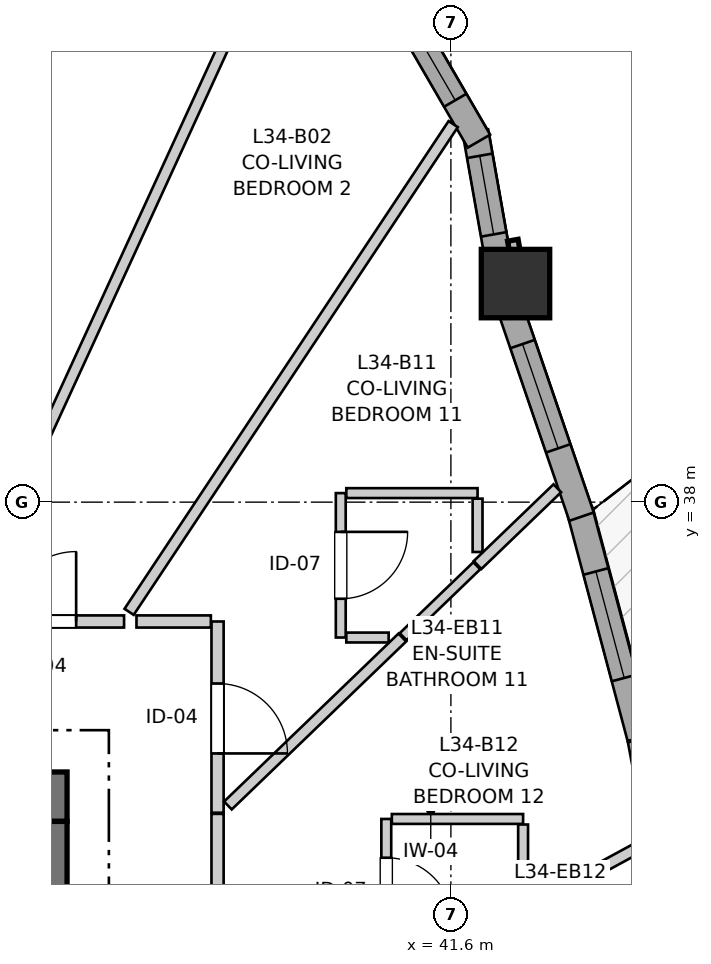
"""IFC4 building model, lengths in metres.
Left out: names, types, materials, properties, quantities, classifications, styles, units other than length and angle.
Written with IfcOpenShell. Run it as: python <this file> out.ifc"""

import sys

from ifc_helpers import new_model, si_unit, direction, frame, frame_2d, origin, origin_2d, place, context, subcontext, project, spatial, rectangle, extrude, source, transform, mapped, element, fill, save


model = new_model("IFC4")
c1 = context("Model", 3, precision=1e-05, world=origin(), true_north=direction((0.0, 1.0)))
c2 = subcontext(c1, "Body", "Model", "MODEL_VIEW")
j1 = project(units=[si_unit("LENGTHUNIT", "METRE"), si_unit("PLANEANGLEUNIT", "RADIAN")], contexts=[c1])
p1 = place(None, origin())
s1 = spatial("IfcSite", under=j1, at=p1, CompositionType="ELEMENT")
p2 = place(p1, origin())
s2 = spatial("IfcBuilding", under=s1, at=p2, CompositionType="ELEMENT")
p3 = place(p2, frame((0.0, 0.0, 115.2)))
s3 = spatial("IfcBuildingStorey", under=s2, at=p3, CompositionType="ELEMENT", Elevation=115.2)
p4 = place(p3, frame((36.55, 34.125, 0.0), z_axis=(0.0, 0.0, 1.0), x_axis=(-1.0, 0.0, 0.0)))
e1 = element("IfcWall", 1, at=p4, inside=s3, PredefinedType="SHEAR", context=c2, shape_type="SweptSolid", body=[
    extrude(rectangle(XDim=12.4, YDim=0.65, at=frame_2d((6.2, 0.0))), origin(), (0.0, 0.0, 1.0), 2.95),
])
p5 = place(p3, frame((36.225, 18.2, 0.0), z_axis=(0.0, 0.0, 1.0), x_axis=(0.0, 1.0, 0.0)))
e2 = element("IfcWall", 2, at=p5, inside=s3, PredefinedType="SHEAR", context=c2, shape_type="SweptSolid", body=[
    extrude(rectangle(XDim=15.6, YDim=0.65, at=frame_2d((7.8, 0.0))), origin(), (0.0, 0.0, 1.0), 2.95),
])
p6 = place(p5, frame((4.25, 0.0, 0.0)))
e3 = element("IfcOpeningElement", 3, at=p6, cuts=e2, PredefinedType="OPENING", context=c2, shape_type="SweptSolid", body=[
    extrude(rectangle(XDim=1.1, YDim=2.15, at=frame_2d((0.55, 1.075))), frame((0.0, 0.335, 0.0), z_axis=(0.0, -1.0, 0.0), x_axis=(1.0, 0.0, 0.0)), (0.0, 0.0, 1.0), 0.67),
])
p7 = place(p5, frame((10.25, 0.0, 0.0)))
e4 = element("IfcOpeningElement", 4, at=p7, cuts=e2, PredefinedType="OPENING", context=c2, shape_type="SweptSolid", body=[
    extrude(rectangle(XDim=1.1, YDim=2.15, at=frame_2d((0.55, 1.075))), frame((0.0, 0.335, 0.0), z_axis=(0.0, -1.0, 0.0), x_axis=(1.0, 0.0, 0.0)), (0.0, 0.0, 1.0), 0.67),
])
m1 = source(origin(), c2, "Body", "SweptSolid", [
    extrude(rectangle(XDim=0.9, YDim=0.9, at=origin_2d()), origin(), (0.0, 0.0, 1.0), 2.95),
])
p8 = place(p3, frame((42.45, 40.875, 0.0), z_axis=(0.0, 0.0, 1.0), x_axis=(1.0, 0.0, 0.0)))
e5 = element("IfcColumn", 5, at=p8, inside=s3, PredefinedType="COLUMN", context=c2, shape_type="MappedRepresentation", body=[
    mapped(m1, transform((0.0, 0.0, 0.0), x_axis=(1.0, 0.0, 0.0), y_axis=(0.0, 1.0, 0.0), z_axis=(0.0, 0.0, 1.0), scale=1.0)),
])
p9 = place(p3, frame((44.664, 31.881, 0.0), z_axis=(0.0, 0.0, 1.0), x_axis=(-0.18665909876, 0.982424745642, 0.0)))
e6 = element("IfcWall", 6, at=p9, inside=s3, PredefinedType="SOLIDWALL", context=c2, shape_type="SweptSolid", body=[
    extrude(rectangle(XDim=3.046, YDim=0.34, at=frame_2d((1.523, 0.0))), origin(), (0.0, 0.0, 1.0), 2.48),
])
p10 = place(p9, frame((0.416, 0.0, 0.82)))
e7 = element("IfcOpeningElement", 7, at=p10, cuts=e6, PredefinedType="OPENING", context=c2, shape_type="SweptSolid", body=[
    extrude(rectangle(XDim=0.95, YDim=1.35, at=frame_2d((0.475, 0.675))), frame((0.0, 0.18, 0.0), z_axis=(0.0, -1.0, 0.0), x_axis=(1.0, 0.0, 0.0)), (0.0, 0.0, 1.0), 0.36),
])
p11 = place(p9, frame((2.054, 0.0, 0.82)))
e8 = element("IfcOpeningElement", 8, at=p11, cuts=e6, PredefinedType="OPENING", context=c2, shape_type="SweptSolid", body=[
    extrude(rectangle(XDim=0.58, YDim=1.35, at=frame_2d((0.29, 0.675))), frame((0.0, 0.18, 0.0), z_axis=(0.0, -1.0, 0.0), x_axis=(1.0, 0.0, 0.0)), (0.0, 0.0, 1.0), 0.36),
])
p12 = place(p3, frame((44.09, 34.901, 0.0), z_axis=(0.0, 0.0, 1.0), x_axis=(-0.257108087637, 0.966382652613, 0.0)))
e9 = element("IfcWall", 9, at=p12, inside=s3, PredefinedType="SOLIDWALL", context=c2, shape_type="SweptSolid", body=[
    extrude(rectangle(XDim=3.096, YDim=0.34, at=frame_2d((1.548, 0.0))), origin(), (0.0, 0.0, 1.0), 2.48),
])
p13 = place(p12, frame((0.813, 0.0, 0.82)))
e10 = element("IfcOpeningElement", 10, at=p13, cuts=e9, PredefinedType="OPENING", context=c2, shape_type="SweptSolid", body=[
    extrude(rectangle(XDim=1.45, YDim=1.25, at=frame_2d((0.725, 0.625))), frame((0.0, 0.18, 0.0), z_axis=(0.0, -1.0, 0.0), x_axis=(1.0, 0.0, 0.0)), (0.0, 0.0, 1.0), 0.36),
])
p14 = place(p3, frame((43.319, 37.809, 0.0), z_axis=(0.0, 0.0, 1.0), x_axis=(-0.323586371726, 0.946198636669, 0.0)))
e11 = element("IfcWall", 11, at=p14, inside=s3, PredefinedType="SOLIDWALL", context=c2, shape_type="SweptSolid", body=[
    extrude(rectangle(XDim=2.952, YDim=0.34, at=frame_2d((1.476, 0.0))), origin(), (0.0, 0.0, 1.0), 2.48),
])
p15 = place(p14, frame((0.949, 0.0, 0.82)))
e12 = element("IfcOpeningElement", 12, at=p15, cuts=e11, PredefinedType="OPENING", context=c2, shape_type="SweptSolid", body=[
    extrude(rectangle(XDim=1.45, YDim=1.25, at=frame_2d((0.725, 0.625))), frame((0.0, 0.18, 0.0), z_axis=(0.0, -1.0, 0.0), x_axis=(1.0, 0.0, 0.0)), (0.0, 0.0, 1.0), 0.36),
])
p16 = place(p3, frame((42.242, 41.072, 0.0), z_axis=(0.0, 0.0, 1.0), x_axis=(-0.17440141227, 0.984674640375, 0.0)))
e13 = element("IfcWall", 13, at=p16, inside=s3, PredefinedType="SOLIDWALL", context=c2, shape_type="SweptSolid", body=[
    extrude(rectangle(XDim=1.831, YDim=0.34, at=frame_2d((0.916, 0.0))), origin(), (0.0, 0.0, 1.0), 2.48),
])
p17 = place(p16, frame((0.457, 0.0, 0.82)))
e14 = element("IfcOpeningElement", 14, at=p17, cuts=e13, PredefinedType="OPENING", context=c2, shape_type="SweptSolid", body=[
    extrude(rectangle(XDim=1.05, YDim=1.45, at=frame_2d((0.525, 0.725))), frame((0.0, 0.18, 0.0), z_axis=(0.0, -1.0, 0.0), x_axis=(1.0, 0.0, 0.0)), (0.0, 0.0, 1.0), 0.36),
])
p18 = place(p3, frame((41.969, 42.749, 0.0), z_axis=(0.0, 0.0, 1.0), x_axis=(-0.501989603552, 0.864873654313, 0.0)))
e15 = element("IfcWall", 15, at=p18, inside=s3, PredefinedType="SOLIDWALL", context=c2, shape_type="SweptSolid", body=[
    extrude(rectangle(XDim=2.099, YDim=0.34, at=frame_2d((1.05, 0.0))), origin(), (0.0, 0.0, 1.0), 2.48),
])
p19 = place(p18, frame((0.622, 0.0, 0.82)))
e16 = element("IfcOpeningElement", 16, at=p19, cuts=e15, PredefinedType="OPENING", context=c2, shape_type="SweptSolid", body=[
    extrude(rectangle(XDim=1.15, YDim=1.2, at=frame_2d((0.575, 0.6))), frame((0.0, 0.18, 0.0), z_axis=(0.0, -1.0, 0.0), x_axis=(1.0, 0.0, 0.0)), (0.0, 0.0, 1.0), 0.36),
])
p20 = place(p3, frame((38.53, 33.899, 0.0), z_axis=(0.0, 0.0, 1.0), x_axis=(0.0, -1.0, 0.0)))
e17 = element("IfcWall", 17, at=p20, inside=s3, PredefinedType="PARTITIONING", context=c2, shape_type="SweptSolid", body=[
    extrude(rectangle(XDim=3.469, YDim=0.16, at=frame_2d((1.734, 0.0))), origin(), (0.0, 0.0, 1.0), 2.95),
])
p21 = place(p20, frame((1.277, 0.0, 0.0)))
e18 = element("IfcOpeningElement", 18, at=p21, cuts=e17, PredefinedType="OPENING", context=c2, shape_type="SweptSolid", body=[
    extrude(rectangle(XDim=0.92, YDim=2.1, at=frame_2d((0.46, 1.05))), frame((0.0, 0.09, 0.0), z_axis=(0.0, -1.0, 0.0), x_axis=(1.0, 0.0, 0.0)), (0.0, 0.0, 1.0), 0.18),
])
p22 = place(p3, frame((38.53, 36.43, 0.0), z_axis=(0.0, 0.0, 1.0), x_axis=(0.0, -1.0, 0.0)))
e19 = element("IfcWall", 19, at=p22, inside=s3, PredefinedType="PARTITIONING", context=c2, shape_type="SweptSolid", body=[
    extrude(rectangle(XDim=2.516, YDim=0.16, at=frame_2d((1.258, 0.0))), origin(), (0.0, 0.0, 1.0), 2.588),
])
p23 = place(p22, frame((0.816, 0.0, 0.0)))
e20 = element("IfcOpeningElement", 20, at=p23, cuts=e19, PredefinedType="OPENING", context=c2, shape_type="SweptSolid", body=[
    extrude(rectangle(XDim=0.92, YDim=2.1, at=frame_2d((0.46, 1.05))), frame((0.0, 0.09, 0.0), z_axis=(0.0, -1.0, 0.0), x_axis=(1.0, 0.0, 0.0)), (0.0, 0.0, 1.0), 0.18),
])
p24 = place(p3, frame((35.121, 36.43, 0.0), z_axis=(0.0, 0.0, 1.0), x_axis=(1.0, 0.0, 0.0)))
e21 = element("IfcWall", 21, at=p24, inside=s3, PredefinedType="PARTITIONING", context=c2, shape_type="SweptSolid", body=[
    extrude(rectangle(XDim=2.179, YDim=0.16, at=frame_2d((1.089, 0.0))), origin(), (0.0, 0.0, 1.0), 2.588),
])
p25 = place(p24, frame((0.628, 0.0, 0.0)))
e22 = element("IfcOpeningElement", 22, at=p25, cuts=e21, PredefinedType="OPENING", context=c2, shape_type="SweptSolid", body=[
    extrude(rectangle(XDim=0.92, YDim=2.1, at=frame_2d((0.46, 1.05))), frame((0.0, 0.09, 0.0), z_axis=(0.0, -1.0, 0.0), x_axis=(1.0, 0.0, 0.0)), (0.0, 0.0, 1.0), 0.18),
])
p26 = place(p3, frame((40.75, 33.832, 0.0), z_axis=(0.0, 0.0, 1.0), x_axis=(0.0, -1.0, 0.0)))
e23 = element("IfcWall", 23, at=p26, inside=s3, PredefinedType="PARTITIONING", context=c2, shape_type="SweptSolid", body=[
    extrude(rectangle(XDim=1.9, YDim=0.13, at=frame_2d((0.95, 0.0))), origin(), (0.0, 0.0, 1.0), 2.95),
])
p27 = place(p26, frame((0.51, 0.0, 0.0)))
e24 = element("IfcOpeningElement", 24, at=p27, cuts=e23, PredefinedType="OPENING", context=c2, shape_type="SweptSolid", body=[
    extrude(rectangle(XDim=0.88, YDim=2.05, at=frame_2d((0.44, 1.025))), frame((0.0, 0.075, 0.0), z_axis=(0.0, -1.0, 0.0), x_axis=(1.0, 0.0, 0.0)), (0.0, 0.0, 1.0), 0.15),
])
p28 = place(p3, frame((40.151, 38.119, 0.0), z_axis=(0.0, 0.0, 1.0), x_axis=(0.0, -1.0, 0.0)))
e25 = element("IfcWall", 25, at=p28, inside=s3, PredefinedType="PARTITIONING", context=c2, shape_type="SweptSolid", body=[
    extrude(rectangle(XDim=1.9, YDim=0.13, at=frame_2d((0.95, 0.0))), origin(), (0.0, 0.0, 1.0), 2.95),
])
p29 = place(p28, frame((0.51, 0.0, 0.0)))
e26 = element("IfcOpeningElement", 26, at=p29, cuts=e25, PredefinedType="OPENING", context=c2, shape_type="SweptSolid", body=[
    extrude(rectangle(XDim=0.88, YDim=2.05, at=frame_2d((0.44, 1.025))), frame((0.0, 0.075, 0.0), z_axis=(0.0, -1.0, 0.0), x_axis=(1.0, 0.0, 0.0)), (0.0, 0.0, 1.0), 0.15),
])
p30 = place(p3, frame((35.191, 36.548, 0.0), z_axis=(0.0, 0.0, 1.0), x_axis=(0.417154036681, 0.908835799075, 0.0)))
e27 = element("IfcWall", 27, at=p30, inside=s3, PredefinedType="PARTITIONING", context=c2, shape_type="SweptSolid", body=[
    extrude(rectangle(XDim=9.949, YDim=0.145, at=frame_2d((4.974, 0.0))), origin(), (0.0, 0.0, 1.0), 2.95),
])
p31 = place(p3, frame((37.366, 36.557, 0.0), z_axis=(0.0, 0.0, 1.0), x_axis=(0.553463679146, 0.832873313215, 0.0)))
e28 = element("IfcWall", 28, at=p31, inside=s3, PredefinedType="PARTITIONING", context=c2, shape_type="SweptSolid", body=[
    extrude(rectangle(XDim=7.704, YDim=0.145, at=frame_2d((3.852, 0.0))), origin(), (0.0, 0.0, 1.0), 2.95),
])
p32 = place(p3, frame((38.666, 34.009, 0.0), z_axis=(0.0, 0.0, 1.0), x_axis=(0.72031454127, 0.693647577402, 0.0)))
e29 = element("IfcWall", 29, at=p32, inside=s3, PredefinedType="PARTITIONING", context=c2, shape_type="SweptSolid", body=[
    extrude(rectangle(XDim=3.186, YDim=0.145, at=frame_2d((1.593, 0.0))), origin(), (0.0, 0.0, 1.0), 2.95),
])
p33 = place(p3, frame((42.535, 32.624, 0.0), z_axis=(0.0, 0.0, 1.0), x_axis=(0.878631690287, 0.477500107669, 0.0)))
e30 = element("IfcWall", 30, at=p33, inside=s3, PredefinedType="PARTITIONING", context=c2, shape_type="SweptSolid", body=[
    extrude(rectangle(XDim=1.861, YDim=0.145, at=frame_2d((0.93, 0.0))), origin(), (0.0, 0.0, 1.0), 2.95),
])
p34 = place(p3, frame((40.224, 38.119, 0.0), z_axis=(0.0, 0.0, 1.0), x_axis=(1.0, 0.0, 0.0)))
e31 = element("IfcWall", 31, at=p34, inside=s3, PredefinedType="PARTITIONING", context=c2, shape_type="SweptSolid", body=[
    extrude(rectangle(XDim=1.727, YDim=0.13, at=frame_2d((0.863, 0.0))), origin(), (0.0, 0.0, 1.0), 2.95),
])
p35 = place(p3, frame((40.823, 33.832, 0.0), z_axis=(0.0, 0.0, 1.0), x_axis=(1.0, 0.0, 0.0)))
e32 = element("IfcWall", 32, at=p35, inside=s3, PredefinedType="PARTITIONING", context=c2, shape_type="SweptSolid", body=[
    extrude(rectangle(XDim=1.727, YDim=0.13, at=frame_2d((0.864, 0.0))), origin(), (0.0, 0.0, 1.0), 2.95),
])
p36 = place(p3, frame((41.951, 37.173, 0.0), z_axis=(0.0, 0.0, 1.0), x_axis=(0.720559112487, 0.693393514111, 0.0)))
e33 = element("IfcWall", 33, at=p36, inside=s3, PredefinedType="PARTITIONING", context=c2, shape_type="SweptSolid", body=[
    extrude(rectangle(XDim=1.456, YDim=0.145, at=frame_2d((0.728, 0.0))), origin(), (0.0, 0.0, 1.0), 2.95),
])
p37 = place(p3, frame((40.972, 36.229, 0.0), z_axis=(0.0, 0.0, 1.0), x_axis=(0.72014550452, 0.693823069896, 0.0)))
e34 = element("IfcWall", 34, at=p37, inside=s3, PredefinedType="PARTITIONING", context=c2, shape_type="SweptSolid", body=[
    extrude(rectangle(XDim=1.345, YDim=0.13, at=frame_2d((0.672, 0.0))), origin(), (0.0, 0.0, 1.0), 2.95),
])
p38 = place(p3, frame((37.463, 36.43, 0.0), z_axis=(0.0, 0.0, 1.0), x_axis=(1.0, 0.0, 0.0)))
e35 = element("IfcWall", 35, at=p38, inside=s3, PredefinedType="PARTITIONING", context=c2, shape_type="SweptSolid", body=[
    extrude(rectangle(XDim=0.979, YDim=0.16, at=frame_2d((0.489, 0.0))), origin(), (0.0, 0.0, 1.0), 2.588),
])
p39 = place(p3, frame((42.55, 32.758, 0.0), z_axis=(0.0, 0.0, 1.0), x_axis=(0.0, 1.0, 0.0)))
e36 = element("IfcWall", 36, at=p39, inside=s3, PredefinedType="PARTITIONING", context=c2, shape_type="SweptSolid", body=[
    extrude(rectangle(XDim=1.001, YDim=0.13, at=frame_2d((0.5, 0.0))), origin(), (0.0, 0.0, 1.0), 2.95),
])
p40 = place(p3, frame((41.951, 37.344, 0.0), z_axis=(0.0, 0.0, 1.0), x_axis=(0.0, 1.0, 0.0)))
e37 = element("IfcWall", 37, at=p40, inside=s3, PredefinedType="PARTITIONING", context=c2, shape_type="SweptSolid", body=[
    extrude(rectangle(XDim=0.702, YDim=0.13, at=frame_2d((0.351, 0.0))), origin(), (0.0, 0.0, 1.0), 2.95),
])
p41 = place(p3, frame((40.224, 36.219, 0.0), z_axis=(0.0, 0.0, 1.0), x_axis=(1.0, 0.0, 0.0)))
e38 = element("IfcWall", 38, at=p41, inside=s3, PredefinedType="PARTITIONING", context=c2, shape_type="SweptSolid", body=[
    extrude(rectangle(XDim=0.557, YDim=0.13, at=frame_2d((0.278, 0.0))), origin(), (0.0, 0.0, 1.0), 2.95),
])
m2 = source(origin(), c2, "Body", "SweptSolid", [
    extrude(rectangle(XDim=1.45, YDim=1.25, at=frame_2d((0.725, 0.625))), frame((0.0, 0.03, 0.0), z_axis=(0.0, -1.0, 0.0), x_axis=(1.0, 0.0, 0.0)), (0.0, 0.0, 1.0), 0.06),
])
p42 = place(p13, origin())
e39 = element("IfcWindow", 39, at=p42, inside=s3, PartitioningType="SINGLE_PANEL", PredefinedType="WINDOW", context=c2, shape_type="MappedRepresentation", body=[
    mapped(m2, transform((0.0, 0.0, 0.0), x_axis=(1.0, 0.0, 0.0), y_axis=(0.0, 1.0, 0.0), z_axis=(0.0, 0.0, 1.0), scale=1.0)),
])
fill(e10, e39)
p43 = place(p15, origin())
e40 = element("IfcWindow", 40, at=p43, inside=s3, PartitioningType="SINGLE_PANEL", PredefinedType="WINDOW", context=c2, shape_type="MappedRepresentation", body=[
    mapped(m2, transform((0.0, 0.0, 0.0), x_axis=(1.0, 0.0, 0.0), y_axis=(0.0, 1.0, 0.0), z_axis=(0.0, 0.0, 1.0), scale=1.0)),
])
fill(e12, e40)
m3 = source(origin(), c2, "Body", "SweptSolid", [
    extrude(rectangle(XDim=1.05, YDim=1.45, at=frame_2d((0.525, 0.725))), frame((0.0, 0.03, 0.0), z_axis=(0.0, -1.0, 0.0), x_axis=(1.0, 0.0, 0.0)), (0.0, 0.0, 1.0), 0.06),
])
p44 = place(p17, origin())
e41 = element("IfcWindow", 41, at=p44, inside=s3, PartitioningType="SINGLE_PANEL", PredefinedType="WINDOW", context=c2, shape_type="MappedRepresentation", body=[
    mapped(m3, transform((0.0, 0.0, 0.0), x_axis=(1.0, 0.0, 0.0), y_axis=(0.0, 1.0, 0.0), z_axis=(0.0, 0.0, 1.0), scale=1.0)),
])
fill(e14, e41)
m4 = source(origin(), c2, "Body", "SweptSolid", [
    extrude(rectangle(XDim=1.15, YDim=1.2, at=frame_2d((0.575, 0.6))), frame((0.0, 0.03, 0.0), z_axis=(0.0, -1.0, 0.0), x_axis=(1.0, 0.0, 0.0)), (0.0, 0.0, 1.0), 0.06),
])
p45 = place(p19, origin())
e42 = element("IfcWindow", 42, at=p45, inside=s3, PartitioningType="SINGLE_PANEL", PredefinedType="WINDOW", context=c2, shape_type="MappedRepresentation", body=[
    mapped(m4, transform((0.0, 0.0, 0.0), x_axis=(1.0, 0.0, 0.0), y_axis=(0.0, 1.0, 0.0), z_axis=(0.0, 0.0, 1.0), scale=1.0)),
])
fill(e16, e42)
m5 = source(origin(), c2, "Body", "SweptSolid", [
    extrude(rectangle(XDim=0.92, YDim=2.1, at=frame_2d((0.46, 1.05))), frame((0.0, 0.025, 0.0), z_axis=(0.0, -1.0, 0.0), x_axis=(1.0, 0.0, 0.0)), (0.0, 0.0, 1.0), 0.05),
])
p46 = place(p23, origin())
e43 = element("IfcDoor", 43, at=p46, inside=s3, OperationType="SINGLE_SWING_RIGHT", PredefinedType="DOOR", context=c2, shape_type="MappedRepresentation", body=[
    mapped(m5, transform((0.0, 0.0, 0.0), x_axis=(1.0, 0.0, 0.0), y_axis=(0.0, 1.0, 0.0), z_axis=(0.0, 0.0, 1.0), scale=1.0)),
])
fill(e20, e43)
p47 = place(p25, origin())
e44 = element("IfcDoor", 44, at=p47, inside=s3, OperationType="SINGLE_SWING_RIGHT", PredefinedType="DOOR", context=c2, shape_type="MappedRepresentation", body=[
    mapped(m5, transform((0.0, 0.0, 0.0), x_axis=(1.0, 0.0, 0.0), y_axis=(0.0, 1.0, 0.0), z_axis=(0.0, 0.0, 1.0), scale=1.0)),
])
fill(e22, e44)
m6 = source(origin(), c2, "Body", "SweptSolid", [
    extrude(rectangle(XDim=0.88, YDim=2.05, at=frame_2d((0.44, 1.025))), frame((0.0, 0.025, 0.0), z_axis=(0.0, -1.0, 0.0), x_axis=(1.0, 0.0, 0.0)), (0.0, 0.0, 1.0), 0.05),
])
p48 = place(p27, origin())
e45 = element("IfcDoor", 45, at=p48, inside=s3, OperationType="SINGLE_SWING_RIGHT", PredefinedType="DOOR", context=c2, shape_type="MappedRepresentation", body=[
    mapped(m6, transform((0.0, 0.0, 0.0), x_axis=(1.0, 0.0, 0.0), y_axis=(0.0, 1.0, 0.0), z_axis=(0.0, 0.0, 1.0), scale=1.0)),
])
fill(e24, e45)
p49 = place(p29, origin())
e46 = element("IfcDoor", 46, at=p49, inside=s3, OperationType="SINGLE_SWING_LEFT", PredefinedType="DOOR", context=c2, shape_type="MappedRepresentation", body=[
    mapped(m6, transform((0.0, 0.0, 0.0), x_axis=(1.0, 0.0, 0.0), y_axis=(0.0, 1.0, 0.0), z_axis=(0.0, 0.0, 1.0), scale=1.0)),
])
fill(e26, e46)
save(model, sys.argv[1])
